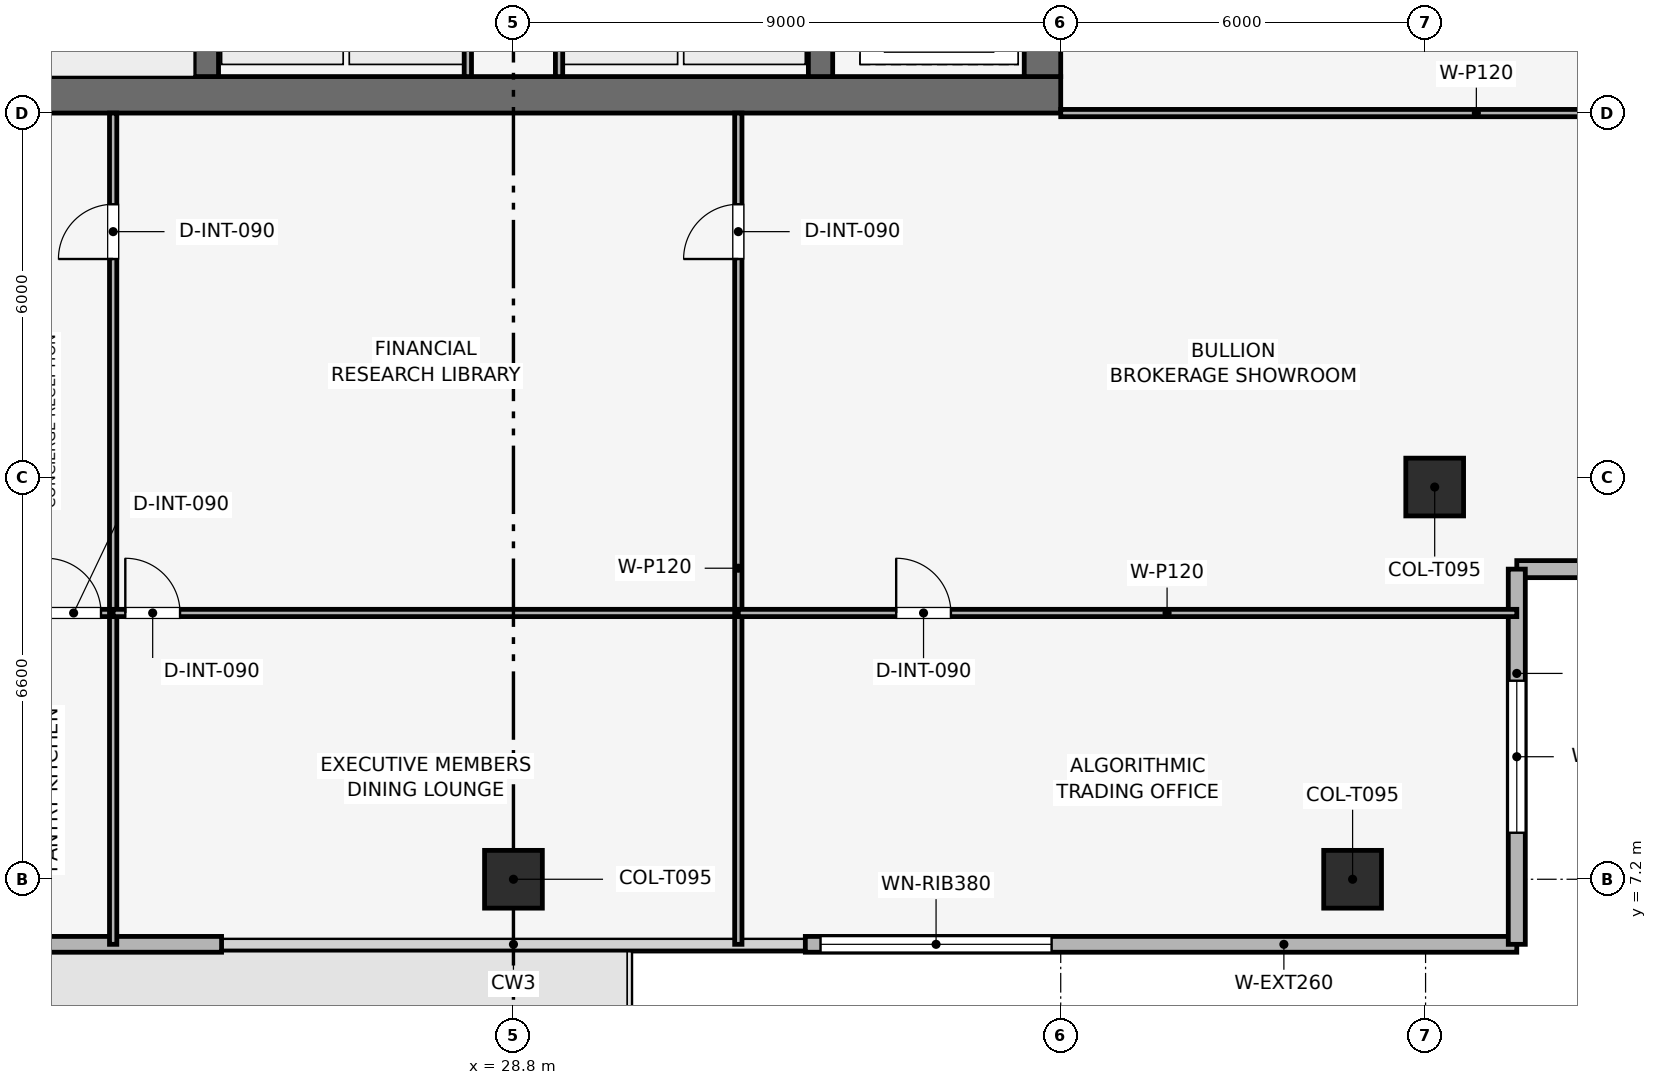
"""IFC4 building model, lengths in metres.
Left out: names, types, materials, properties, quantities, classifications, styles, units other than length and angle.
Written with IfcOpenShell. Run it as: python <this file> out.ifc"""

import sys

from ifc_helpers import new_model, si_unit, direction, frame, frame_2d, origin, origin_2d, place, context, subcontext, project, spatial, rectangle, extrude, element, fill, save


model = new_model("IFC4")
c1 = context("Model", 3, precision=1e-05, world=origin(), true_north=direction((0.0, 1.0)))
c2 = subcontext(c1, "Body", "Model", "MODEL_VIEW")
j1 = project(units=[si_unit("LENGTHUNIT", "METRE"), si_unit("PLANEANGLEUNIT", "RADIAN")], contexts=[c1])
p1 = place(None, origin())
s1 = spatial("IfcSite", under=j1, at=p1, CompositionType="ELEMENT")
p2 = place(p1, origin())
s2 = spatial("IfcBuilding", under=s1, at=p2, CompositionType="ELEMENT")
p3 = place(p2, frame((0.0, 0.0, 325.5)))
s3 = spatial("IfcBuildingStorey", under=s2, at=p3, CompositionType="ELEMENT", Elevation=325.5)
p4 = place(p3, frame((19.8, 20.1, 0.0), z_axis=(0.0, 0.0, 1.0), x_axis=(1.0, 0.0, 0.0)))
e1 = element("IfcWall", 1, at=p4, inside=s3, PredefinedType="SHEAR", context=c2, shape_type="SweptSolid", body=[
    extrude(rectangle(XDim=18.0, YDim=0.6, at=frame_2d((9.0, 0.0))), origin(), (0.0, 0.0, 1.0), 3.75),
])
p5 = place(p3, frame((37.5, 20.4, 0.0), z_axis=(0.0, 0.0, 1.0), x_axis=(0.0, 1.0, 0.0)))
e2 = element("IfcWall", 2, at=p5, inside=s3, PredefinedType="SHEAR", context=c2, shape_type="SweptSolid", body=[
    extrude(rectangle(XDim=16.8, YDim=0.6, at=frame_2d((8.4, 0.0))), origin(), (0.0, 0.0, 1.0), 3.75),
])
p6 = place(p5, frame((4.9, 0.0, 0.0)))
e3 = element("IfcOpeningElement", 3, at=p6, cuts=e2, PredefinedType="OPENING", context=c2, shape_type="SweptSolid", body=[
    extrude(rectangle(XDim=1.1, YDim=2.15, at=frame_2d((0.55, 1.075))), frame((0.0, 0.31, 0.0), z_axis=(0.0, -1.0, 0.0), x_axis=(1.0, 0.0, 0.0)), (0.0, 0.0, 1.0), 0.62),
])
for number, where, z_axis, x_axis in (
    (4, (23.75, 20.4, 0.0), (0.0, 0.0, 1.0), (0.0, 1.0, 0.0)),
    (5, (33.85, 20.4, 0.0), (0.0, 0.0, 1.0), (0.0, 1.0, 0.0)),
):
    element("IfcWall", number, at=place(p3, frame(where, z_axis=z_axis, x_axis=x_axis)), inside=s3, PredefinedType="SHEAR", context=c2, shape_type="SweptSolid", body=[
        extrude(rectangle(XDim=16.8, YDim=0.4, at=frame_2d((8.4, 0.0))), origin(), (0.0, 0.0, 1.0), 3.75),
    ])
for number, where, z_axis, x_axis in (
    (6, (28.8, 7.2, 0.003), (0.0, 0.0, 1.0), (1.0, 0.0, 0.0)),
    (7, (42.6, 7.2, 0.003), (0.0, 0.0, 1.0), (1.0, 0.0, 0.0)),
    (8, (43.95, 13.65, 0.003), (0.0, 0.0, 1.0), (1.0, 0.0, 0.0)),
):
    element("IfcColumn", number, at=place(p3, frame(where, z_axis=z_axis, x_axis=x_axis)), inside=s3, PredefinedType="COLUMN", context=c2, shape_type="SweptSolid", body=[
        extrude(rectangle(XDim=0.95, YDim=0.95, at=origin_2d()), origin(), (0.0, 0.0, 1.0), 3.504),
    ])
p7 = place(p3, frame((45.3, 6.13, 0.0), z_axis=(0.0, 0.0, 1.0), x_axis=(-1.0, 0.0, 0.0)))
e9 = element("IfcWall", 9, at=p7, inside=s3, PredefinedType="SOLIDWALL", context=c2, shape_type="SweptSolid", body=[
    extrude(rectangle(XDim=11.7, YDim=0.26, at=frame_2d((5.85, 0.0))), origin(), (0.0, 0.0, 1.0), 3.51),
])
p8 = place(p7, frame((7.65, 0.0, 0.9)))
e10 = element("IfcOpeningElement", 10, at=p8, cuts=e9, PredefinedType="OPENING", context=c2, shape_type="SweptSolid", body=[
    extrude(rectangle(XDim=3.8, YDim=1.9, at=frame_2d((1.9, 0.95))), frame((0.0, 0.14, 0.0), z_axis=(0.0, -1.0, 0.0), x_axis=(1.0, 0.0, 0.0)), (0.0, 0.0, 1.0), 0.28),
])
p9 = place(p3, frame((24.0, 6.13, 0.0), z_axis=(0.0, 0.0, 1.0), x_axis=(-1.0, 0.0, 0.0)))
e11 = element("IfcWall", 11, at=p9, inside=s3, PredefinedType="SOLIDWALL", context=c2, shape_type="SweptSolid", body=[
    extrude(rectangle(XDim=11.7, YDim=0.26, at=frame_2d((5.85, 0.0))), origin(), (0.0, 0.0, 1.0), 3.51),
])
p10 = place(p9, frame((6.083, 0.0, 0.0)))
e12 = element("IfcOpeningElement", 12, at=p10, cuts=e11, PredefinedType="OPENING", context=c2, shape_type="SweptSolid", body=[
    extrude(rectangle(XDim=1.0, YDim=2.2, at=frame_2d((0.5, 1.1))), frame((0.0, 0.14, 0.0), z_axis=(0.0, -1.0, 0.0), x_axis=(1.0, 0.0, 0.0)), (0.0, 0.0, 1.0), 0.28),
])
p11 = place(p3, frame((51.47, 12.3, 0.0), z_axis=(0.0, 0.0, 1.0), x_axis=(-1.0, 0.0, 0.0)))
e13 = element("IfcWall", 13, at=p11, inside=s3, PredefinedType="SOLIDWALL", context=c2, shape_type="SweptSolid", body=[
    extrude(rectangle(XDim=6.17, YDim=0.28, at=frame_2d((3.085, 0.0))), origin(), (0.0, 0.0, 1.0), 3.51),
])
p12 = place(p11, frame((1.835, 0.0, 0.9)))
e14 = element("IfcOpeningElement", 14, at=p12, cuts=e13, PredefinedType="OPENING", context=c2, shape_type="SweptSolid", body=[
    extrude(rectangle(XDim=2.5, YDim=1.9, at=frame_2d((1.25, 0.95))), frame((0.0, 0.15, 0.0), z_axis=(0.0, -1.0, 0.0), x_axis=(1.0, 0.0, 0.0)), (0.0, 0.0, 1.0), 0.3),
])
p13 = place(p3, frame((45.3, 12.3, 0.0), z_axis=(0.0, 0.0, 1.0), x_axis=(0.0, -1.0, 0.0)))
e15 = element("IfcWall", 15, at=p13, inside=s3, PredefinedType="SOLIDWALL", context=c2, shape_type="SweptSolid", body=[
    extrude(rectangle(XDim=6.17, YDim=0.28, at=frame_2d((3.085, 0.0))), origin(), (0.0, 0.0, 1.0), 3.51),
])
p14 = place(p13, frame((1.835, 0.0, 0.9)))
e16 = element("IfcOpeningElement", 16, at=p14, cuts=e15, PredefinedType="OPENING", context=c2, shape_type="SweptSolid", body=[
    extrude(rectangle(XDim=2.5, YDim=1.9, at=frame_2d((1.25, 0.95))), frame((0.0, 0.15, 0.0), z_axis=(0.0, -1.0, 0.0), x_axis=(1.0, 0.0, 0.0)), (0.0, 0.0, 1.0), 0.3),
])
p15 = place(p3, frame((28.05, 20.4, 0.0), z_axis=(0.0, 0.0, 1.0), x_axis=(0.0, 1.0, 0.0)))
e17 = element("IfcWall", 17, at=p15, inside=s3, PredefinedType="PARTITIONING", context=c2, shape_type="SweptSolid", body=[
    extrude(rectangle(XDim=8.15, YDim=0.12, at=frame_2d((4.075, 0.0))), origin(), (0.0, 0.0, 1.0), 3.51),
])
p16 = place(p3, frame((29.55, 20.4, 0.0), z_axis=(0.0, 0.0, 1.0), x_axis=(0.0, 1.0, 0.0)))
e18 = element("IfcWall", 18, at=p16, inside=s3, PredefinedType="PARTITIONING", context=c2, shape_type="SweptSolid", body=[
    extrude(rectangle(XDim=2.75, YDim=0.12, at=frame_2d((1.375, 0.0))), origin(), (0.0, 0.0, 1.0), 3.51),
])
p17 = place(p3, frame((19.8, 11.579, 0.0), z_axis=(0.0, 0.0, 1.0), x_axis=(1.0, 0.0, 0.0)))
e19 = element("IfcWall", 19, at=p17, inside=s3, PredefinedType="PARTITIONING", context=c2, shape_type="SweptSolid", body=[
    extrude(rectangle(XDim=2.417, YDim=0.12, at=frame_2d((1.208, 0.0))), origin(), (0.0, 0.0, 1.0), 3.095),
])
p18 = place(p17, frame((1.317, 0.0, 0.0)))
e20 = element("IfcOpeningElement", 20, at=p18, cuts=e19, PredefinedType="OPENING", context=c2, shape_type="SweptSolid", body=[
    extrude(rectangle(XDim=0.9, YDim=2.1, at=frame_2d((0.45, 1.05))), frame((0.0, 0.07, 0.0), z_axis=(0.0, -1.0, 0.0), x_axis=(1.0, 0.0, 0.0)), (0.0, 0.0, 1.0), 0.14),
])
p19 = place(p3, frame((22.217, 6.13, 0.0), z_axis=(0.0, 0.0, 1.0), x_axis=(0.0, 1.0, 0.0)))
e21 = element("IfcWall", 21, at=p19, inside=s3, PredefinedType="PARTITIONING", context=c2, shape_type="SweptSolid", body=[
    extrude(rectangle(XDim=13.67, YDim=0.12, at=frame_2d((6.835, 0.0))), origin(), (0.0, 0.0, 1.0), 3.135),
])
p20 = place(p19, frame((11.27, 0.0, 0.0)))
e22 = element("IfcOpeningElement", 22, at=p20, cuts=e21, PredefinedType="OPENING", context=c2, shape_type="SweptSolid", body=[
    extrude(rectangle(XDim=0.9, YDim=2.1, at=frame_2d((0.45, 1.05))), frame((0.0, 0.07, 0.0), z_axis=(0.0, -1.0, 0.0), x_axis=(1.0, 0.0, 0.0)), (0.0, 0.0, 1.0), 0.14),
])
p21 = place(p3, frame((22.217, 11.579, 0.0), z_axis=(0.0, 0.0, 1.0), x_axis=(1.0, 0.0, 0.0)))
e23 = element("IfcWall", 23, at=p21, inside=s3, PredefinedType="PARTITIONING", context=c2, shape_type="SweptSolid", body=[
    extrude(rectangle(XDim=10.281, YDim=0.12, at=frame_2d((5.141, 0.0))), origin(), (0.0, 0.0, 1.0), 3.095),
])
p22 = place(p21, frame((0.2, 0.0, 0.0)))
e24 = element("IfcOpeningElement", 24, at=p22, cuts=e23, PredefinedType="OPENING", context=c2, shape_type="SweptSolid", body=[
    extrude(rectangle(XDim=0.9, YDim=2.1, at=frame_2d((0.45, 1.05))), frame((0.0, 0.07, 0.0), z_axis=(0.0, -1.0, 0.0), x_axis=(1.0, 0.0, 0.0)), (0.0, 0.0, 1.0), 0.14),
])
p23 = place(p3, frame((32.498, 6.13, 0.0), z_axis=(0.0, 0.0, 1.0), x_axis=(0.0, 1.0, 0.0)))
e25 = element("IfcWall", 25, at=p23, inside=s3, PredefinedType="PARTITIONING", context=c2, shape_type="SweptSolid", body=[
    extrude(rectangle(XDim=13.67, YDim=0.12, at=frame_2d((6.835, 0.0))), origin(), (0.0, 0.0, 1.0), 3.135),
])
p24 = place(p23, frame((11.27, 0.0, 0.0)))
e26 = element("IfcOpeningElement", 26, at=p24, cuts=e25, PredefinedType="OPENING", context=c2, shape_type="SweptSolid", body=[
    extrude(rectangle(XDim=0.9, YDim=2.1, at=frame_2d((0.45, 1.05))), frame((0.0, 0.07, 0.0), z_axis=(0.0, -1.0, 0.0), x_axis=(1.0, 0.0, 0.0)), (0.0, 0.0, 1.0), 0.14),
])
p25 = place(p3, frame((32.498, 11.579, 0.0), z_axis=(0.0, 0.0, 1.0), x_axis=(1.0, 0.0, 0.0)))
e27 = element("IfcWall", 27, at=p25, inside=s3, PredefinedType="PARTITIONING", context=c2, shape_type="SweptSolid", body=[
    extrude(rectangle(XDim=12.802, YDim=0.12, at=frame_2d((6.401, 0.0))), origin(), (0.0, 0.0, 1.0), 3.095),
])
p26 = place(p25, frame((2.596, 0.0, 0.0)))
e28 = element("IfcOpeningElement", 28, at=p26, cuts=e27, PredefinedType="OPENING", context=c2, shape_type="SweptSolid", body=[
    extrude(rectangle(XDim=0.9, YDim=2.1, at=frame_2d((0.45, 1.05))), frame((0.0, 0.07, 0.0), z_axis=(0.0, -1.0, 0.0), x_axis=(1.0, 0.0, 0.0)), (0.0, 0.0, 1.0), 0.14),
])
p27 = place(p3, frame((37.8, 19.8, 0.0), z_axis=(0.0, 0.0, 1.0), x_axis=(1.0, 0.0, 0.0)))
e29 = element("IfcWall", 29, at=p27, inside=s3, PredefinedType="PARTITIONING", context=c2, shape_type="SweptSolid", body=[
    extrude(rectangle(XDim=13.67, YDim=0.12, at=frame_2d((6.835, 0.0))), origin(), (0.0, 0.0, 1.0), 3.095),
])
p28 = place(p8, origin())
e30 = element("IfcWindow", 30, at=p28, inside=s3, PartitioningType="SINGLE_PANEL", PredefinedType="WINDOW", context=c2, shape_type="SweptSolid", body=[
    extrude(rectangle(XDim=3.8, YDim=1.9, at=frame_2d((1.9, 0.95))), frame((0.0, 0.03, 0.0), z_axis=(0.0, -1.0, 0.0), x_axis=(1.0, 0.0, 0.0)), (0.0, 0.0, 1.0), 0.06),
])
fill(e10, e30)
p29 = place(p14, origin())
e31 = element("IfcWindow", 31, at=p29, inside=s3, PartitioningType="SINGLE_PANEL", PredefinedType="WINDOW", context=c2, shape_type="SweptSolid", body=[
    extrude(rectangle(XDim=2.5, YDim=1.9, at=frame_2d((1.25, 0.95))), frame((0.0, 0.03, 0.0), z_axis=(0.0, -1.0, 0.0), x_axis=(1.0, 0.0, 0.0)), (0.0, 0.0, 1.0), 0.06),
])
fill(e16, e31)
p30 = place(p18, origin())
e32 = element("IfcDoor", 32, at=p30, inside=s3, OperationType="SINGLE_SWING_LEFT", PredefinedType="DOOR", context=c2, shape_type="SweptSolid", body=[
    extrude(rectangle(XDim=0.9, YDim=2.1, at=frame_2d((0.45, 1.05))), frame((0.0, 0.025, 0.0), z_axis=(0.0, -1.0, 0.0), x_axis=(1.0, 0.0, 0.0)), (0.0, 0.0, 1.0), 0.05),
])
fill(e20, e32)
p31 = place(p20, origin())
e33 = element("IfcDoor", 33, at=p31, inside=s3, OperationType="SINGLE_SWING_LEFT", PredefinedType="DOOR", context=c2, shape_type="SweptSolid", body=[
    extrude(rectangle(XDim=0.9, YDim=2.1, at=frame_2d((0.45, 1.05))), frame((0.0, 0.025, 0.0), z_axis=(0.0, -1.0, 0.0), x_axis=(1.0, 0.0, 0.0)), (0.0, 0.0, 1.0), 0.05),
])
fill(e22, e33)
p32 = place(p22, origin())
e34 = element("IfcDoor", 34, at=p32, inside=s3, OperationType="SINGLE_SWING_LEFT", PredefinedType="DOOR", context=c2, shape_type="SweptSolid", body=[
    extrude(rectangle(XDim=0.9, YDim=2.1, at=frame_2d((0.45, 1.05))), frame((0.0, 0.025, 0.0), z_axis=(0.0, -1.0, 0.0), x_axis=(1.0, 0.0, 0.0)), (0.0, 0.0, 1.0), 0.05),
])
fill(e24, e34)
p33 = place(p24, origin())
e35 = element("IfcDoor", 35, at=p33, inside=s3, OperationType="SINGLE_SWING_LEFT", PredefinedType="DOOR", context=c2, shape_type="SweptSolid", body=[
    extrude(rectangle(XDim=0.9, YDim=2.1, at=frame_2d((0.45, 1.05))), frame((0.0, 0.025, 0.0), z_axis=(0.0, -1.0, 0.0), x_axis=(1.0, 0.0, 0.0)), (0.0, 0.0, 1.0), 0.05),
])
fill(e26, e35)
p34 = place(p26, origin())
e36 = element("IfcDoor", 36, at=p34, inside=s3, OperationType="SINGLE_SWING_LEFT", PredefinedType="DOOR", context=c2, shape_type="SweptSolid", body=[
    extrude(rectangle(XDim=0.9, YDim=2.1, at=frame_2d((0.45, 1.05))), frame((0.0, 0.025, 0.0), z_axis=(0.0, -1.0, 0.0), x_axis=(1.0, 0.0, 0.0)), (0.0, 0.0, 1.0), 0.05),
])
fill(e28, e36)
save(model, sys.argv[1])
